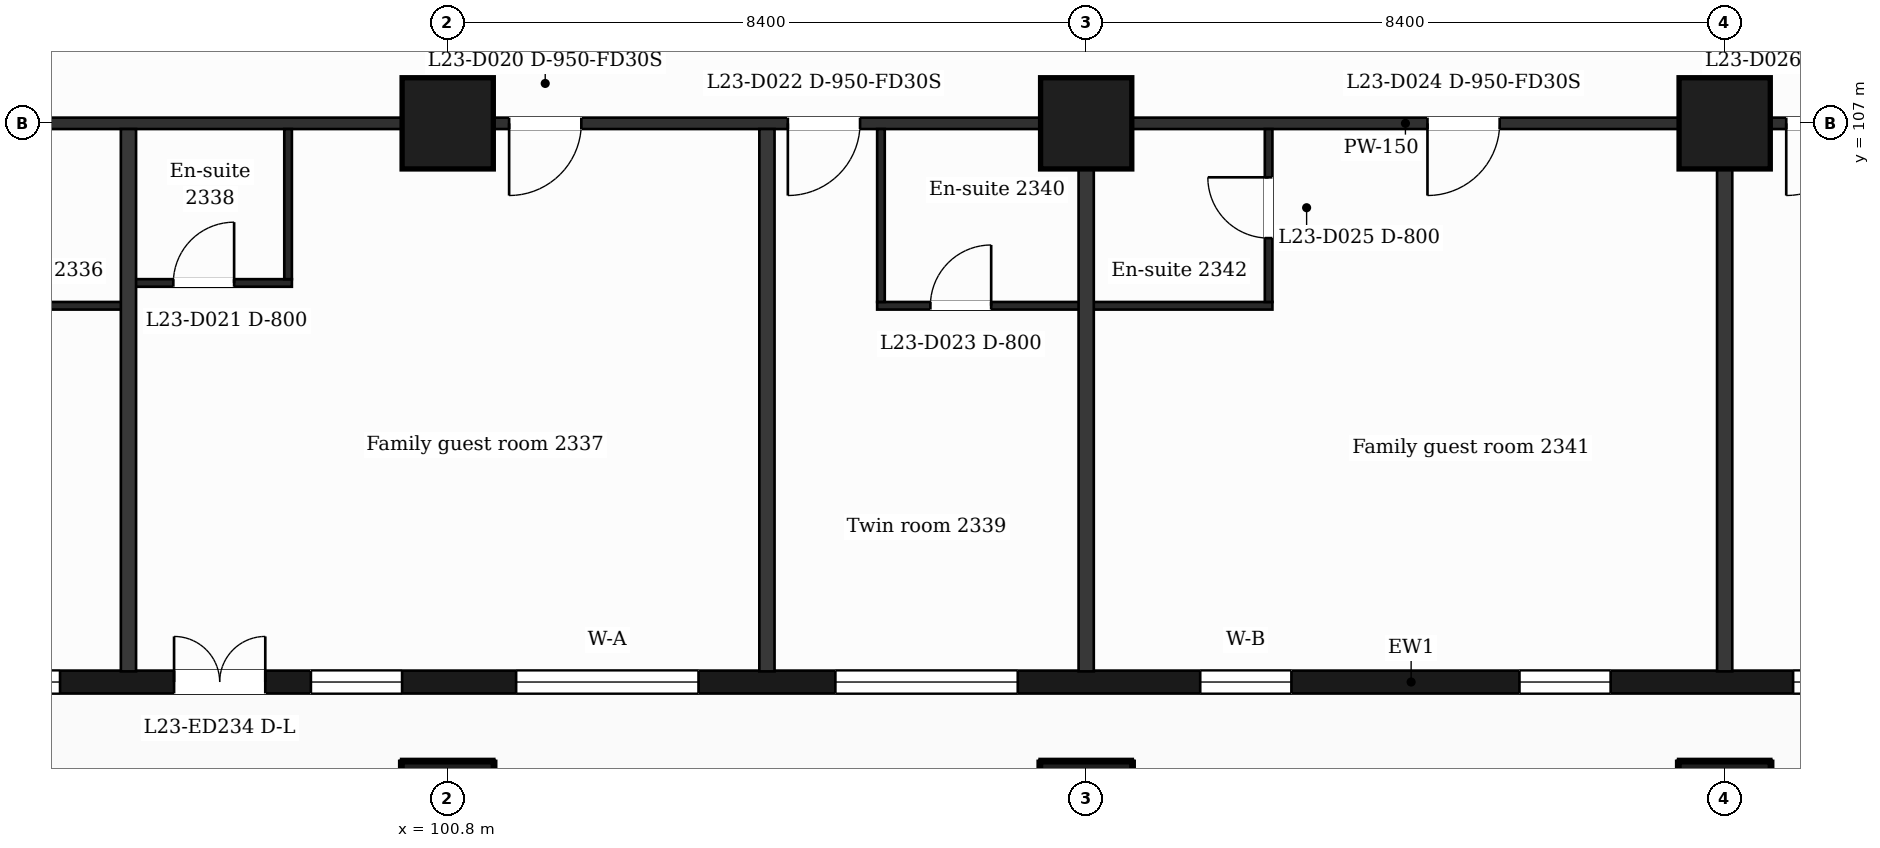
"""IFC4 building model, lengths in metres.
Left out: names, types, materials, properties, quantities, classifications, styles, units other than length and angle.
Written with IfcOpenShell. Run it as: python <this file> out.ifc"""

import sys

from ifc_helpers import new_model, si_unit, direction, frame, frame_2d, origin, origin_2d, place, context, subcontext, project, spatial, rectangle, extrude, element, fill, save


model = new_model("IFC4")
c1 = context("Model", 3, precision=1e-05, world=origin(), true_north=direction((0.0, 1.0)))
c2 = subcontext(c1, "Body", "Model", "MODEL_VIEW")
j1 = project(units=[si_unit("LENGTHUNIT", "METRE"), si_unit("PLANEANGLEUNIT", "RADIAN")], contexts=[c1])
p1 = place(None, origin())
s1 = spatial("IfcSite", under=j1, at=p1, CompositionType="ELEMENT")
p2 = place(p1, origin())
s2 = spatial("IfcBuilding", under=s1, at=p2, CompositionType="ELEMENT")
p3 = place(p2, frame((0.0, 0.0, 102.1)))
s3 = spatial("IfcBuildingStorey", under=s2, at=p3, CompositionType="ELEMENT", Elevation=102.1)
for number, where, z_axis, x_axis in (
    (1, (100.8, 98.0, 0.0), (0.0, 0.0, 1.0), (1.0, 0.0, 0.0)),
    (2, (109.2, 98.0, 0.0), (0.0, 0.0, 1.0), (1.0, 0.0, 0.0)),
    (3, (117.6, 98.0, 0.0), (0.0, 0.0, 1.0), (1.0, 0.0, 0.0)),
    (4, (100.8, 107.0, 0.0), (0.0, 0.0, 1.0), (1.0, 0.0, 0.0)),
    (5, (109.2, 107.0, 0.0), (0.0, 0.0, 1.0), (1.0, 0.0, 0.0)),
    (6, (117.6, 107.0, 0.0), (0.0, 0.0, 1.0), (1.0, 0.0, 0.0)),
):
    element("IfcColumn", number, at=place(p3, frame(where, z_axis=z_axis, x_axis=x_axis)), inside=s3, PredefinedType="COLUMN", context=c2, shape_type="SweptSolid", body=[
        extrude(rectangle(XDim=1.2, YDim=1.2, at=origin_2d()), origin(), (0.0, 0.0, 1.0), 3.7),
    ])
p4 = place(p3, frame((89.85, 99.65, 0.0), z_axis=(0.0, 0.0, 1.0), x_axis=(1.0, 0.0, 0.0)))
e7 = element("IfcWall", 7, at=p4, inside=s3, PredefinedType="SOLIDWALL", context=c2, shape_type="SweptSolid", body=[
    extrude(rectangle(XDim=47.25, YDim=0.3, at=frame_2d((23.625, 0.0))), origin(), (0.0, 0.0, 1.0), 3.38),
])
p5 = place(p4, frame((0.725, 0.0, 0.9)))
e8 = element("IfcOpeningElement", 8, at=p5, cuts=e7, PredefinedType="OPENING", context=c2, shape_type="SweptSolid", body=[
    extrude(rectangle(XDim=1.2, YDim=2.1, at=frame_2d((0.6, 1.05))), frame((0.0, 0.16, 0.0), z_axis=(0.0, -1.0, 0.0), x_axis=(1.0, 0.0, 0.0)), (0.0, 0.0, 1.0), 0.32),
])
p6 = place(p4, frame((3.45, 0.0, 0.9)))
e9 = element("IfcOpeningElement", 9, at=p6, cuts=e7, PredefinedType="OPENING", context=c2, shape_type="SweptSolid", body=[
    extrude(rectangle(XDim=2.4, YDim=2.1, at=frame_2d((1.2, 1.05))), frame((0.0, 0.16, 0.0), z_axis=(0.0, -1.0, 0.0), x_axis=(1.0, 0.0, 0.0)), (0.0, 0.0, 1.0), 0.32),
])
p7 = place(p4, frame((7.35, 0.0, 0.0)))
e10 = element("IfcOpeningElement", 10, at=p7, cuts=e7, PredefinedType="OPENING", context=c2, shape_type="SweptSolid", body=[
    extrude(rectangle(XDim=1.2, YDim=2.4, at=frame_2d((0.6, 1.2))), frame((0.0, 0.16, 0.0), z_axis=(0.0, -1.0, 0.0), x_axis=(1.0, 0.0, 0.0)), (0.0, 0.0, 1.0), 0.32),
])
p8 = place(p4, frame((9.15, 0.0, 0.9)))
e11 = element("IfcOpeningElement", 11, at=p8, cuts=e7, PredefinedType="OPENING", context=c2, shape_type="SweptSolid", body=[
    extrude(rectangle(XDim=1.2, YDim=2.1, at=frame_2d((0.6, 1.05))), frame((0.0, 0.16, 0.0), z_axis=(0.0, -1.0, 0.0), x_axis=(1.0, 0.0, 0.0)), (0.0, 0.0, 1.0), 0.32),
])
p9 = place(p4, frame((11.85, 0.0, 0.9)))
e12 = element("IfcOpeningElement", 12, at=p9, cuts=e7, PredefinedType="OPENING", context=c2, shape_type="SweptSolid", body=[
    extrude(rectangle(XDim=2.4, YDim=2.1, at=frame_2d((1.2, 1.05))), frame((0.0, 0.16, 0.0), z_axis=(0.0, -1.0, 0.0), x_axis=(1.0, 0.0, 0.0)), (0.0, 0.0, 1.0), 0.32),
])
p10 = place(p4, frame((16.05, 0.0, 0.9)))
e13 = element("IfcOpeningElement", 13, at=p10, cuts=e7, PredefinedType="OPENING", context=c2, shape_type="SweptSolid", body=[
    extrude(rectangle(XDim=2.4, YDim=2.1, at=frame_2d((1.2, 1.05))), frame((0.0, 0.16, 0.0), z_axis=(0.0, -1.0, 0.0), x_axis=(1.0, 0.0, 0.0)), (0.0, 0.0, 1.0), 0.32),
])
p11 = place(p4, frame((20.85, 0.0, 0.9)))
e14 = element("IfcOpeningElement", 14, at=p11, cuts=e7, PredefinedType="OPENING", context=c2, shape_type="SweptSolid", body=[
    extrude(rectangle(XDim=1.2, YDim=2.1, at=frame_2d((0.6, 1.05))), frame((0.0, 0.16, 0.0), z_axis=(0.0, -1.0, 0.0), x_axis=(1.0, 0.0, 0.0)), (0.0, 0.0, 1.0), 0.32),
])
p12 = place(p4, frame((25.05, 0.0, 0.9)))
e15 = element("IfcOpeningElement", 15, at=p12, cuts=e7, PredefinedType="OPENING", context=c2, shape_type="SweptSolid", body=[
    extrude(rectangle(XDim=1.2, YDim=2.1, at=frame_2d((0.6, 1.05))), frame((0.0, 0.16, 0.0), z_axis=(0.0, -1.0, 0.0), x_axis=(1.0, 0.0, 0.0)), (0.0, 0.0, 1.0), 0.32),
])
p13 = place(p4, frame((28.65, 0.0, 0.9)))
e16 = element("IfcOpeningElement", 16, at=p13, cuts=e7, PredefinedType="OPENING", context=c2, shape_type="SweptSolid", body=[
    extrude(rectangle(XDim=2.4, YDim=2.1, at=frame_2d((1.2, 1.05))), frame((0.0, 0.16, 0.0), z_axis=(0.0, -1.0, 0.0), x_axis=(1.0, 0.0, 0.0)), (0.0, 0.0, 1.0), 0.32),
])
p14 = place(p4, frame((32.85, 0.0, 0.9)))
e17 = element("IfcOpeningElement", 17, at=p14, cuts=e7, PredefinedType="OPENING", context=c2, shape_type="SweptSolid", body=[
    extrude(rectangle(XDim=2.4, YDim=2.1, at=frame_2d((1.2, 1.05))), frame((0.0, 0.16, 0.0), z_axis=(0.0, -1.0, 0.0), x_axis=(1.0, 0.0, 0.0)), (0.0, 0.0, 1.0), 0.32),
])
p15 = place(p4, frame((37.05, 0.0, 0.9)))
e18 = element("IfcOpeningElement", 18, at=p15, cuts=e7, PredefinedType="OPENING", context=c2, shape_type="SweptSolid", body=[
    extrude(rectangle(XDim=2.4, YDim=2.1, at=frame_2d((1.2, 1.05))), frame((0.0, 0.16, 0.0), z_axis=(0.0, -1.0, 0.0), x_axis=(1.0, 0.0, 0.0)), (0.0, 0.0, 1.0), 0.32),
])
p16 = place(p4, frame((41.25, 0.0, 0.9)))
e19 = element("IfcOpeningElement", 19, at=p16, cuts=e7, PredefinedType="OPENING", context=c2, shape_type="SweptSolid", body=[
    extrude(rectangle(XDim=2.4, YDim=2.1, at=frame_2d((1.2, 1.05))), frame((0.0, 0.16, 0.0), z_axis=(0.0, -1.0, 0.0), x_axis=(1.0, 0.0, 0.0)), (0.0, 0.0, 1.0), 0.32),
])
p17 = place(p4, frame((45.25, 0.0, 0.9)))
e20 = element("IfcOpeningElement", 20, at=p17, cuts=e7, PredefinedType="OPENING", context=c2, shape_type="SweptSolid", body=[
    extrude(rectangle(XDim=1.2, YDim=2.1, at=frame_2d((0.6, 1.05))), frame((0.0, 0.16, 0.0), z_axis=(0.0, -1.0, 0.0), x_axis=(1.0, 0.0, 0.0)), (0.0, 0.0, 1.0), 0.32),
])
p18 = place(p3, frame((94.15, 104.6, 0.0), z_axis=(0.0, 0.0, 1.0), x_axis=(1.0, 0.0, 0.0)))
e21 = element("IfcWall", 21, at=p18, inside=s3, PredefinedType="PARTITIONING", context=c2, shape_type="SweptSolid", body=[
    extrude(rectangle(XDim=2.45, YDim=0.1, at=frame_2d((1.225, 0.0))), origin(), (0.0, 0.0, 1.0), 3.38),
])
p19 = place(p3, frame((106.45, 104.6, 0.0), z_axis=(0.0, 0.0, 1.0), x_axis=(1.0, 0.0, 0.0)))
e22 = element("IfcWall", 22, at=p19, inside=s3, PredefinedType="PARTITIONING", context=c2, shape_type="SweptSolid", body=[
    extrude(rectangle(XDim=5.2, YDim=0.1, at=frame_2d((2.6, 0.0))), origin(), (0.0, 0.0, 1.0), 3.38),
])
p20 = place(p19, frame((0.7, 0.0, 0.0)))
e23 = element("IfcOpeningElement", 23, at=p20, cuts=e22, PredefinedType="OPENING", context=c2, shape_type="SweptSolid", body=[
    extrude(rectangle(XDim=0.8, YDim=2.1, at=frame_2d((0.4, 1.05))), frame((0.0, 0.06, 0.0), z_axis=(0.0, -1.0, 0.0), x_axis=(1.0, 0.0, 0.0)), (0.0, 0.0, 1.0), 0.12),
])
p21 = place(p3, frame((96.6, 104.9, 0.0), z_axis=(0.0, 0.0, 1.0), x_axis=(1.0, 0.0, 0.0)))
e24 = element("IfcWall", 24, at=p21, inside=s3, PredefinedType="PARTITIONING", context=c2, shape_type="SweptSolid", body=[
    extrude(rectangle(XDim=2.15, YDim=0.1, at=frame_2d((1.075, 0.0))), origin(), (0.0, 0.0, 1.0), 3.38),
])
p22 = place(p21, frame((0.59, 0.0, 0.0)))
e25 = element("IfcOpeningElement", 25, at=p22, cuts=e24, PredefinedType="OPENING", context=c2, shape_type="SweptSolid", body=[
    extrude(rectangle(XDim=0.8, YDim=2.1, at=frame_2d((0.4, 1.05))), frame((0.0, 0.06, 0.0), z_axis=(0.0, -1.0, 0.0), x_axis=(1.0, 0.0, 0.0)), (0.0, 0.0, 1.0), 0.12),
])
p23 = place(p3, frame((87.018, 107.0, 0.0), z_axis=(0.0, 0.0, 1.0), x_axis=(1.0, 0.0, 0.0)))
e26 = element("IfcWall", 26, at=p23, inside=s3, PredefinedType="PARTITIONING", context=c2, shape_type="SweptSolid", body=[
    extrude(rectangle(XDim=52.765, YDim=0.15, at=frame_2d((26.382, 0.0))), origin(), (0.0, 0.0, 1.0), 3.38),
])
p24 = place(p23, frame((1.276, 0.0, 0.0)))
e27 = element("IfcOpeningElement", 27, at=p24, cuts=e26, PredefinedType="OPENING", context=c2, shape_type="SweptSolid", body=[
    extrude(rectangle(XDim=0.95, YDim=2.1, at=frame_2d((0.475, 1.05))), frame((0.0, 0.085, 0.0), z_axis=(0.0, -1.0, 0.0), x_axis=(1.0, 0.0, 0.0)), (0.0, 0.0, 1.0), 0.17),
])
p25 = place(p23, frame((6.152, 0.0, 0.0)))
e28 = element("IfcOpeningElement", 28, at=p25, cuts=e26, PredefinedType="OPENING", context=c2, shape_type="SweptSolid", body=[
    extrude(rectangle(XDim=0.95, YDim=2.1, at=frame_2d((0.475, 1.05))), frame((0.0, 0.085, 0.0), z_axis=(0.0, -1.0, 0.0), x_axis=(1.0, 0.0, 0.0)), (0.0, 0.0, 1.0), 0.17),
])
p26 = place(p23, frame((14.59, 0.0, 0.0)))
e29 = element("IfcOpeningElement", 29, at=p26, cuts=e26, PredefinedType="OPENING", context=c2, shape_type="SweptSolid", body=[
    extrude(rectangle(XDim=0.95, YDim=2.1, at=frame_2d((0.475, 1.05))), frame((0.0, 0.085, 0.0), z_axis=(0.0, -1.0, 0.0), x_axis=(1.0, 0.0, 0.0)), (0.0, 0.0, 1.0), 0.17),
])
p27 = place(p23, frame((18.257, 0.0, 0.0)))
e30 = element("IfcOpeningElement", 30, at=p27, cuts=e26, PredefinedType="OPENING", context=c2, shape_type="SweptSolid", body=[
    extrude(rectangle(XDim=0.95, YDim=2.1, at=frame_2d((0.475, 1.05))), frame((0.0, 0.085, 0.0), z_axis=(0.0, -1.0, 0.0), x_axis=(1.0, 0.0, 0.0)), (0.0, 0.0, 1.0), 0.17),
])
p28 = place(p23, frame((26.672, 0.0, 0.0)))
e31 = element("IfcOpeningElement", 31, at=p28, cuts=e26, PredefinedType="OPENING", context=c2, shape_type="SweptSolid", body=[
    extrude(rectangle(XDim=0.95, YDim=2.1, at=frame_2d((0.475, 1.05))), frame((0.0, 0.085, 0.0), z_axis=(0.0, -1.0, 0.0), x_axis=(1.0, 0.0, 0.0)), (0.0, 0.0, 1.0), 0.17),
])
p29 = place(p23, frame((31.392, 0.0, 0.0)))
e32 = element("IfcOpeningElement", 32, at=p29, cuts=e26, PredefinedType="OPENING", context=c2, shape_type="SweptSolid", body=[
    extrude(rectangle(XDim=0.95, YDim=2.1, at=frame_2d((0.475, 1.05))), frame((0.0, 0.085, 0.0), z_axis=(0.0, -1.0, 0.0), x_axis=(1.0, 0.0, 0.0)), (0.0, 0.0, 1.0), 0.17),
])
p30 = place(p23, frame((37.182, 0.0, 0.0)))
e33 = element("IfcOpeningElement", 33, at=p30, cuts=e26, PredefinedType="OPENING", context=c2, shape_type="SweptSolid", body=[
    extrude(rectangle(XDim=0.95, YDim=2.1, at=frame_2d((0.475, 1.05))), frame((0.0, 0.085, 0.0), z_axis=(0.0, -1.0, 0.0), x_axis=(1.0, 0.0, 0.0)), (0.0, 0.0, 1.0), 0.17),
])
p31 = place(p23, frame((41.762, 0.0, 0.0)))
e34 = element("IfcOpeningElement", 34, at=p31, cuts=e26, PredefinedType="OPENING", context=c2, shape_type="SweptSolid", body=[
    extrude(rectangle(XDim=0.95, YDim=2.1, at=frame_2d((0.475, 1.05))), frame((0.0, 0.085, 0.0), z_axis=(0.0, -1.0, 0.0), x_axis=(1.0, 0.0, 0.0)), (0.0, 0.0, 1.0), 0.17),
])
p32 = place(p23, frame((49.285, 0.0, 0.0)))
e35 = element("IfcOpeningElement", 35, at=p32, cuts=e26, PredefinedType="OPENING", context=c2, shape_type="SweptSolid", body=[
    extrude(rectangle(XDim=0.95, YDim=2.1, at=frame_2d((0.475, 1.05))), frame((0.0, 0.085, 0.0), z_axis=(0.0, -1.0, 0.0), x_axis=(1.0, 0.0, 0.0)), (0.0, 0.0, 1.0), 0.17),
])
p33 = place(p3, frame((96.6, 99.79, 0.0), z_axis=(0.0, 0.0, 1.0), x_axis=(0.0, 1.0, 0.0)))
e36 = element("IfcWall", 36, at=p33, inside=s3, PredefinedType="PARTITIONING", context=c2, shape_type="SweptSolid", body=[
    extrude(rectangle(XDim=7.135, YDim=0.2, at=frame_2d((3.567, 0.0))), origin(), (0.0, 0.0, 1.0), 3.38),
])
p34 = place(p3, frame((98.7, 104.95, 0.0), z_axis=(0.0, 0.0, 1.0), x_axis=(0.0, 1.0, 0.0)))
e37 = element("IfcWall", 37, at=p34, inside=s3, PredefinedType="PARTITIONING", context=c2, shape_type="SweptSolid", body=[
    extrude(rectangle(XDim=1.975, YDim=0.1, at=frame_2d((0.988, 0.0))), origin(), (0.0, 0.0, 1.0), 3.38),
])
p35 = place(p3, frame((105.0, 99.79, 0.0), z_axis=(0.0, 0.0, 1.0), x_axis=(0.0, 1.0, 0.0)))
e38 = element("IfcWall", 38, at=p35, inside=s3, PredefinedType="PARTITIONING", context=c2, shape_type="SweptSolid", body=[
    extrude(rectangle(XDim=7.135, YDim=0.2, at=frame_2d((3.567, 0.0))), origin(), (0.0, 0.0, 1.0), 3.38),
])
p36 = place(p3, frame((106.5, 104.65, 0.0), z_axis=(0.0, 0.0, 1.0), x_axis=(0.0, 1.0, 0.0)))
e39 = element("IfcWall", 39, at=p36, inside=s3, PredefinedType="PARTITIONING", context=c2, shape_type="SweptSolid", body=[
    extrude(rectangle(XDim=2.275, YDim=0.1, at=frame_2d((1.138, 0.0))), origin(), (0.0, 0.0, 1.0), 3.38),
])
p37 = place(p3, frame((109.2, 99.79, 0.0), z_axis=(0.0, 0.0, 1.0), x_axis=(0.0, 1.0, 0.0)))
e40 = element("IfcWall", 40, at=p37, inside=s3, PredefinedType="PARTITIONING", context=c2, shape_type="SweptSolid", body=[
    extrude(rectangle(XDim=7.135, YDim=0.2, at=frame_2d((3.567, 0.0))), origin(), (0.0, 0.0, 1.0), 3.38),
])
p38 = place(p3, frame((111.6, 104.65, 0.0), z_axis=(0.0, 0.0, 1.0), x_axis=(0.0, 1.0, 0.0)))
e41 = element("IfcWall", 41, at=p38, inside=s3, PredefinedType="PARTITIONING", context=c2, shape_type="SweptSolid", body=[
    extrude(rectangle(XDim=2.275, YDim=0.1, at=frame_2d((1.138, 0.0))), origin(), (0.0, 0.0, 1.0), 3.38),
])
p39 = place(p38, frame((0.84, 0.0, 0.0)))
e42 = element("IfcOpeningElement", 42, at=p39, cuts=e41, PredefinedType="OPENING", context=c2, shape_type="SweptSolid", body=[
    extrude(rectangle(XDim=0.8, YDim=2.1, at=frame_2d((0.4, 1.05))), frame((0.0, 0.06, 0.0), z_axis=(0.0, -1.0, 0.0), x_axis=(1.0, 0.0, 0.0)), (0.0, 0.0, 1.0), 0.12),
])
p40 = place(p3, frame((117.6, 99.79, 0.0), z_axis=(0.0, 0.0, 1.0), x_axis=(0.0, 1.0, 0.0)))
e43 = element("IfcWall", 43, at=p40, inside=s3, PredefinedType="PARTITIONING", context=c2, shape_type="SweptSolid", body=[
    extrude(rectangle(XDim=7.135, YDim=0.2, at=frame_2d((3.567, 0.0))), origin(), (0.0, 0.0, 1.0), 3.38),
])
p41 = place(p6, origin())
e44 = element("IfcWindow", 44, at=p41, inside=s3, PartitioningType="SINGLE_PANEL", PredefinedType="WINDOW", context=c2, shape_type="SweptSolid", body=[
    extrude(rectangle(XDim=2.4, YDim=2.1, at=frame_2d((1.2, 1.05))), frame((0.0, 0.03, 0.0), z_axis=(0.0, -1.0, 0.0), x_axis=(1.0, 0.0, 0.0)), (0.0, 0.0, 1.0), 0.06),
])
fill(e9, e44)
p42 = place(p7, origin())
e45 = element("IfcDoor", 45, at=p42, inside=s3, OperationType="DOUBLE_DOOR_SINGLE_SWING", PredefinedType="DOOR", context=c2, shape_type="SweptSolid", body=[
    extrude(rectangle(XDim=1.2, YDim=2.4, at=frame_2d((0.6, 1.2))), frame((0.0, 0.025, 0.0), z_axis=(0.0, -1.0, 0.0), x_axis=(1.0, 0.0, 0.0)), (0.0, 0.0, 1.0), 0.05),
])
fill(e10, e45)
p43 = place(p8, origin())
e46 = element("IfcWindow", 46, at=p43, inside=s3, PartitioningType="SINGLE_PANEL", PredefinedType="WINDOW", context=c2, shape_type="SweptSolid", body=[
    extrude(rectangle(XDim=1.2, YDim=2.1, at=frame_2d((0.6, 1.05))), frame((0.0, 0.03, 0.0), z_axis=(0.0, -1.0, 0.0), x_axis=(1.0, 0.0, 0.0)), (0.0, 0.0, 1.0), 0.06),
])
fill(e11, e46)
p44 = place(p9, origin())
e47 = element("IfcWindow", 47, at=p44, inside=s3, PartitioningType="SINGLE_PANEL", PredefinedType="WINDOW", context=c2, shape_type="SweptSolid", body=[
    extrude(rectangle(XDim=2.4, YDim=2.1, at=frame_2d((1.2, 1.05))), frame((0.0, 0.03, 0.0), z_axis=(0.0, -1.0, 0.0), x_axis=(1.0, 0.0, 0.0)), (0.0, 0.0, 1.0), 0.06),
])
fill(e12, e47)
p45 = place(p10, origin())
e48 = element("IfcWindow", 48, at=p45, inside=s3, PartitioningType="SINGLE_PANEL", PredefinedType="WINDOW", context=c2, shape_type="SweptSolid", body=[
    extrude(rectangle(XDim=2.4, YDim=2.1, at=frame_2d((1.2, 1.05))), frame((0.0, 0.03, 0.0), z_axis=(0.0, -1.0, 0.0), x_axis=(1.0, 0.0, 0.0)), (0.0, 0.0, 1.0), 0.06),
])
fill(e13, e48)
p46 = place(p11, origin())
e49 = element("IfcWindow", 49, at=p46, inside=s3, PartitioningType="SINGLE_PANEL", PredefinedType="WINDOW", context=c2, shape_type="SweptSolid", body=[
    extrude(rectangle(XDim=1.2, YDim=2.1, at=frame_2d((0.6, 1.05))), frame((0.0, 0.03, 0.0), z_axis=(0.0, -1.0, 0.0), x_axis=(1.0, 0.0, 0.0)), (0.0, 0.0, 1.0), 0.06),
])
fill(e14, e49)
p47 = place(p12, origin())
e50 = element("IfcWindow", 50, at=p47, inside=s3, PartitioningType="SINGLE_PANEL", PredefinedType="WINDOW", context=c2, shape_type="SweptSolid", body=[
    extrude(rectangle(XDim=1.2, YDim=2.1, at=frame_2d((0.6, 1.05))), frame((0.0, 0.03, 0.0), z_axis=(0.0, -1.0, 0.0), x_axis=(1.0, 0.0, 0.0)), (0.0, 0.0, 1.0), 0.06),
])
fill(e15, e50)
p48 = place(p13, origin())
e51 = element("IfcWindow", 51, at=p48, inside=s3, PartitioningType="SINGLE_PANEL", PredefinedType="WINDOW", context=c2, shape_type="SweptSolid", body=[
    extrude(rectangle(XDim=2.4, YDim=2.1, at=frame_2d((1.2, 1.05))), frame((0.0, 0.03, 0.0), z_axis=(0.0, -1.0, 0.0), x_axis=(1.0, 0.0, 0.0)), (0.0, 0.0, 1.0), 0.06),
])
fill(e16, e51)
p49 = place(p26, origin())
e52 = element("IfcDoor", 52, at=p49, inside=s3, OperationType="SINGLE_SWING_LEFT", PredefinedType="DOOR", context=c2, shape_type="SweptSolid", body=[
    extrude(rectangle(XDim=0.95, YDim=2.1, at=frame_2d((0.475, 1.05))), frame((0.0, 0.025, 0.0), z_axis=(0.0, -1.0, 0.0), x_axis=(1.0, 0.0, 0.0)), (0.0, 0.0, 1.0), 0.05),
])
fill(e29, e52)
p50 = place(p22, origin())
e53 = element("IfcDoor", 53, at=p50, inside=s3, OperationType="SINGLE_SWING_RIGHT", PredefinedType="DOOR", context=c2, shape_type="SweptSolid", body=[
    extrude(rectangle(XDim=0.8, YDim=2.1, at=frame_2d((0.4, 1.05))), frame((0.0, 0.025, 0.0), z_axis=(0.0, -1.0, 0.0), x_axis=(1.0, 0.0, 0.0)), (0.0, 0.0, 1.0), 0.05),
])
fill(e25, e53)
p51 = place(p27, origin())
e54 = element("IfcDoor", 54, at=p51, inside=s3, OperationType="SINGLE_SWING_LEFT", PredefinedType="DOOR", context=c2, shape_type="SweptSolid", body=[
    extrude(rectangle(XDim=0.95, YDim=2.1, at=frame_2d((0.475, 1.05))), frame((0.0, 0.025, 0.0), z_axis=(0.0, -1.0, 0.0), x_axis=(1.0, 0.0, 0.0)), (0.0, 0.0, 1.0), 0.05),
])
fill(e30, e54)
p52 = place(p20, origin())
e55 = element("IfcDoor", 55, at=p52, inside=s3, OperationType="SINGLE_SWING_RIGHT", PredefinedType="DOOR", context=c2, shape_type="SweptSolid", body=[
    extrude(rectangle(XDim=0.8, YDim=2.1, at=frame_2d((0.4, 1.05))), frame((0.0, 0.025, 0.0), z_axis=(0.0, -1.0, 0.0), x_axis=(1.0, 0.0, 0.0)), (0.0, 0.0, 1.0), 0.05),
])
fill(e23, e55)
p53 = place(p28, origin())
e56 = element("IfcDoor", 56, at=p53, inside=s3, OperationType="SINGLE_SWING_LEFT", PredefinedType="DOOR", context=c2, shape_type="SweptSolid", body=[
    extrude(rectangle(XDim=0.95, YDim=2.1, at=frame_2d((0.475, 1.05))), frame((0.0, 0.025, 0.0), z_axis=(0.0, -1.0, 0.0), x_axis=(1.0, 0.0, 0.0)), (0.0, 0.0, 1.0), 0.05),
])
fill(e31, e56)
p54 = place(p39, origin())
e57 = element("IfcDoor", 57, at=p54, inside=s3, OperationType="SINGLE_SWING_RIGHT", PredefinedType="DOOR", context=c2, shape_type="SweptSolid", body=[
    extrude(rectangle(XDim=0.8, YDim=2.1, at=frame_2d((0.4, 1.05))), frame((0.0, 0.025, 0.0), z_axis=(0.0, -1.0, 0.0), x_axis=(1.0, 0.0, 0.0)), (0.0, 0.0, 1.0), 0.05),
])
fill(e42, e57)
p55 = place(p29, origin())
e58 = element("IfcDoor", 58, at=p55, inside=s3, OperationType="SINGLE_SWING_LEFT", PredefinedType="DOOR", context=c2, shape_type="SweptSolid", body=[
    extrude(rectangle(XDim=0.95, YDim=2.1, at=frame_2d((0.475, 1.05))), frame((0.0, 0.025, 0.0), z_axis=(0.0, -1.0, 0.0), x_axis=(1.0, 0.0, 0.0)), (0.0, 0.0, 1.0), 0.05),
])
fill(e32, e58)
save(model, sys.argv[1])
